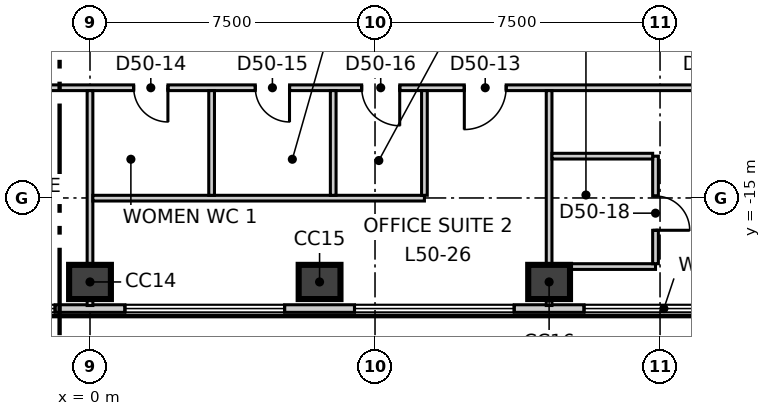
"""IFC4 building model, lengths in metres.
Left out: names, types, materials, properties, quantities, classifications, styles, units other than length and angle.
Written with IfcOpenShell. Run it as: python <this file> out.ifc"""

import sys

from ifc_helpers import new_model, si_unit, direction, frame, frame_2d, origin, origin_2d, place, context, subcontext, project, spatial, rectangle, extrude, element, fill, save


model = new_model("IFC4")
c1 = context("Model", 3, precision=1e-05, world=origin(), true_north=direction((0.0, 1.0)))
c2 = subcontext(c1, "Body", "Model", "MODEL_VIEW")
j1 = project(units=[si_unit("LENGTHUNIT", "METRE"), si_unit("PLANEANGLEUNIT", "RADIAN")], contexts=[c1])
p1 = place(None, origin())
s1 = spatial("IfcSite", under=j1, at=p1, CompositionType="ELEMENT")
p2 = place(p1, origin())
s2 = spatial("IfcBuilding", under=s1, at=p2, CompositionType="ELEMENT")
p3 = place(p2, frame((0.0, 0.0, 215.3)))
s3 = spatial("IfcBuildingStorey", under=s2, at=p3, CompositionType="ELEMENT", Elevation=215.3)
for number, where, z_axis, x_axis in (
    (1, (0.0, -17.21, -0.3), (0.0, 0.0, 1.0), (1.0, 0.0, 0.0)),
    (2, (6.041, -17.21, -0.3), (0.0, 0.0, 1.0), (1.0, 0.0, 0.0)),
    (3, (12.081, -17.21, -0.3), (0.0, 0.0, 1.0), (1.0, 0.0, 0.0)),
):
    element("IfcColumn", number, at=place(p3, frame(where, z_axis=z_axis, x_axis=x_axis)), inside=s3, PredefinedType="COLUMN", context=c2, shape_type="SweptSolid", body=[
        extrude(rectangle(XDim=1.1, YDim=0.9, at=origin_2d()), origin(), (0.0, 0.0, 1.0), 4.0),
    ])
p4 = place(p3, frame((-25.465, -17.91, 0.0), z_axis=(0.0, 0.0, 1.0), x_axis=(1.0, 0.0, 0.0)))
e4 = element("IfcWall", 4, at=p4, inside=s3, PredefinedType="ELEMENTEDWALL", context=c2, shape_type="SweptSolid", body=[
    extrude(rectangle(XDim=50.91, YDim=0.2, at=frame_2d((25.455, 0.0))), origin(), (0.0, 0.0, 1.0), 3.7),
])
p5 = place(p4, frame((2.223, 0.0, 0.9)))
e5 = element("IfcOpeningElement", 5, at=p5, cuts=e4, PredefinedType="OPENING", context=c2, shape_type="SweptSolid", body=[
    extrude(rectangle(XDim=4.2, YDim=2.5, at=frame_2d((2.1, 1.25))), frame((0.0, 0.11, 0.0), z_axis=(0.0, -1.0, 0.0), x_axis=(1.0, 0.0, 0.0)), (0.0, 0.0, 1.0), 0.22),
])
p6 = place(p4, frame((8.264, 0.0, 0.9)))
e6 = element("IfcOpeningElement", 6, at=p6, cuts=e4, PredefinedType="OPENING", context=c2, shape_type="SweptSolid", body=[
    extrude(rectangle(XDim=4.2, YDim=2.5, at=frame_2d((2.1, 1.25))), frame((0.0, 0.11, 0.0), z_axis=(0.0, -1.0, 0.0), x_axis=(1.0, 0.0, 0.0)), (0.0, 0.0, 1.0), 0.22),
])
p7 = place(p4, frame((14.304, 0.0, 0.9)))
e7 = element("IfcOpeningElement", 7, at=p7, cuts=e4, PredefinedType="OPENING", context=c2, shape_type="SweptSolid", body=[
    extrude(rectangle(XDim=4.2, YDim=2.5, at=frame_2d((2.1, 1.25))), frame((0.0, 0.11, 0.0), z_axis=(0.0, -1.0, 0.0), x_axis=(1.0, 0.0, 0.0)), (0.0, 0.0, 1.0), 0.22),
])
p8 = place(p4, frame((20.345, 0.0, 0.9)))
e8 = element("IfcOpeningElement", 8, at=p8, cuts=e4, PredefinedType="OPENING", context=c2, shape_type="SweptSolid", body=[
    extrude(rectangle(XDim=4.2, YDim=2.5, at=frame_2d((2.1, 1.25))), frame((0.0, 0.11, 0.0), z_axis=(0.0, -1.0, 0.0), x_axis=(1.0, 0.0, 0.0)), (0.0, 0.0, 1.0), 0.22),
])
p9 = place(p4, frame((26.385, 0.0, 0.9)))
e9 = element("IfcOpeningElement", 9, at=p9, cuts=e4, PredefinedType="OPENING", context=c2, shape_type="SweptSolid", body=[
    extrude(rectangle(XDim=4.2, YDim=2.5, at=frame_2d((2.1, 1.25))), frame((0.0, 0.11, 0.0), z_axis=(0.0, -1.0, 0.0), x_axis=(1.0, 0.0, 0.0)), (0.0, 0.0, 1.0), 0.22),
])
p10 = place(p4, frame((32.426, 0.0, 0.9)))
e10 = element("IfcOpeningElement", 10, at=p10, cuts=e4, PredefinedType="OPENING", context=c2, shape_type="SweptSolid", body=[
    extrude(rectangle(XDim=4.2, YDim=2.5, at=frame_2d((2.1, 1.25))), frame((0.0, 0.11, 0.0), z_axis=(0.0, -1.0, 0.0), x_axis=(1.0, 0.0, 0.0)), (0.0, 0.0, 1.0), 0.22),
])
p11 = place(p4, frame((38.466, 0.0, 0.9)))
e11 = element("IfcOpeningElement", 11, at=p11, cuts=e4, PredefinedType="OPENING", context=c2, shape_type="SweptSolid", body=[
    extrude(rectangle(XDim=4.2, YDim=2.5, at=frame_2d((2.1, 1.25))), frame((0.0, 0.11, 0.0), z_axis=(0.0, -1.0, 0.0), x_axis=(1.0, 0.0, 0.0)), (0.0, 0.0, 1.0), 0.22),
])
p12 = place(p4, frame((44.507, 0.0, 0.9)))
e12 = element("IfcOpeningElement", 12, at=p12, cuts=e4, PredefinedType="OPENING", context=c2, shape_type="SweptSolid", body=[
    extrude(rectangle(XDim=4.2, YDim=2.5, at=frame_2d((2.1, 1.25))), frame((0.0, 0.11, 0.0), z_axis=(0.0, -1.0, 0.0), x_axis=(1.0, 0.0, 0.0)), (0.0, 0.0, 1.0), 0.22),
])
p13 = place(p3, frame((28.243, -13.098, 0.0), z_axis=(0.0, 0.0, 1.0), x_axis=(-0.500001688958, 0.866024428662, 0.0)))
e13 = element("IfcWall", 13, at=p13, inside=s3, PredefinedType="ELEMENTEDWALL", context=c2, shape_type="SweptSolid", body=[
    extrude(rectangle(XDim=50.909, YDim=0.2, at=frame_2d((25.455, 0.0))), origin(), (0.0, 0.0, 1.0), 3.7),
])
p14 = place(p13, frame((2.223, 0.0, 0.9)))
e14 = element("IfcOpeningElement", 14, at=p14, cuts=e13, PredefinedType="OPENING", context=c2, shape_type="SweptSolid", body=[
    extrude(rectangle(XDim=4.2, YDim=2.5, at=frame_2d((2.1, 1.25))), frame((0.0, 0.11, 0.0), z_axis=(0.0, -1.0, 0.0), x_axis=(1.0, 0.0, 0.0)), (0.0, 0.0, 1.0), 0.22),
])
p15 = place(p13, frame((8.263, 0.0, 0.9)))
e15 = element("IfcOpeningElement", 15, at=p15, cuts=e13, PredefinedType="OPENING", context=c2, shape_type="SweptSolid", body=[
    extrude(rectangle(XDim=4.2, YDim=2.5, at=frame_2d((2.1, 1.25))), frame((0.0, 0.11, 0.0), z_axis=(0.0, -1.0, 0.0), x_axis=(1.0, 0.0, 0.0)), (0.0, 0.0, 1.0), 0.22),
])
p16 = place(p13, frame((14.304, 0.0, 0.9)))
e16 = element("IfcOpeningElement", 16, at=p16, cuts=e13, PredefinedType="OPENING", context=c2, shape_type="SweptSolid", body=[
    extrude(rectangle(XDim=4.2, YDim=2.5, at=frame_2d((2.1, 1.25))), frame((0.0, 0.11, 0.0), z_axis=(0.0, -1.0, 0.0), x_axis=(1.0, 0.0, 0.0)), (0.0, 0.0, 1.0), 0.22),
])
p17 = place(p13, frame((20.345, 0.0, 0.9)))
e17 = element("IfcOpeningElement", 17, at=p17, cuts=e13, PredefinedType="OPENING", context=c2, shape_type="SweptSolid", body=[
    extrude(rectangle(XDim=4.2, YDim=2.5, at=frame_2d((2.1, 1.25))), frame((0.0, 0.11, 0.0), z_axis=(0.0, -1.0, 0.0), x_axis=(1.0, 0.0, 0.0)), (0.0, 0.0, 1.0), 0.22),
])
p18 = place(p13, frame((26.385, 0.0, 0.9)))
e18 = element("IfcOpeningElement", 18, at=p18, cuts=e13, PredefinedType="OPENING", context=c2, shape_type="SweptSolid", body=[
    extrude(rectangle(XDim=4.2, YDim=2.5, at=frame_2d((2.1, 1.25))), frame((0.0, 0.11, 0.0), z_axis=(0.0, -1.0, 0.0), x_axis=(1.0, 0.0, 0.0)), (0.0, 0.0, 1.0), 0.22),
])
p19 = place(p13, frame((32.426, 0.0, 0.9)))
e19 = element("IfcOpeningElement", 19, at=p19, cuts=e13, PredefinedType="OPENING", context=c2, shape_type="SweptSolid", body=[
    extrude(rectangle(XDim=4.2, YDim=2.5, at=frame_2d((2.1, 1.25))), frame((0.0, 0.11, 0.0), z_axis=(0.0, -1.0, 0.0), x_axis=(1.0, 0.0, 0.0)), (0.0, 0.0, 1.0), 0.22),
])
p20 = place(p13, frame((38.466, 0.0, 0.9)))
e20 = element("IfcOpeningElement", 20, at=p20, cuts=e13, PredefinedType="OPENING", context=c2, shape_type="SweptSolid", body=[
    extrude(rectangle(XDim=4.2, YDim=2.5, at=frame_2d((2.1, 1.25))), frame((0.0, 0.11, 0.0), z_axis=(0.0, -1.0, 0.0), x_axis=(1.0, 0.0, 0.0)), (0.0, 0.0, 1.0), 0.22),
])
p21 = place(p13, frame((44.507, 0.0, 0.9)))
e21 = element("IfcOpeningElement", 21, at=p21, cuts=e13, PredefinedType="OPENING", context=c2, shape_type="SweptSolid", body=[
    extrude(rectangle(XDim=4.2, YDim=2.5, at=frame_2d((2.1, 1.25))), frame((0.0, 0.11, 0.0), z_axis=(0.0, -1.0, 0.0), x_axis=(1.0, 0.0, 0.0)), (0.0, 0.0, 1.0), 0.22),
])
p22 = place(p3, frame((-20.883, -11.97, 0.0), z_axis=(0.0, 0.0, 1.0), x_axis=(0.500006150555, 0.866021852731, 0.0)))
e22 = element("IfcWall", 22, at=p22, inside=s3, PredefinedType="PARTITIONING", context=c2, shape_type="SweptSolid", body=[
    extrude(rectangle(XDim=41.766, YDim=0.15, at=frame_2d((20.883, 0.0))), origin(), (0.0, 0.0, 1.0), 3.7),
])
p23 = place(p22, frame((36.816, 0.0, 0.0)))
e23 = element("IfcOpeningElement", 23, at=p23, cuts=e22, PredefinedType="OPENING", context=c2, shape_type="SweptSolid", body=[
    extrude(rectangle(XDim=1.1, YDim=2.1, at=frame_2d((0.55, 1.05))), frame((0.0, 0.085, 0.0), z_axis=(0.0, -1.0, 0.0), x_axis=(1.0, 0.0, 0.0)), (0.0, 0.0, 1.0), 0.17),
])
p24 = place(p22, frame((23.939, 0.0, 0.0)))
e24 = element("IfcOpeningElement", 24, at=p24, cuts=e22, PredefinedType="OPENING", context=c2, shape_type="SweptSolid", body=[
    extrude(rectangle(XDim=1.1, YDim=2.1, at=frame_2d((0.55, 1.05))), frame((0.0, 0.085, 0.0), z_axis=(0.0, -1.0, 0.0), x_axis=(1.0, 0.0, 0.0)), (0.0, 0.0, 1.0), 0.17),
])
p25 = place(p22, frame((31.139, 0.0, 0.0)))
e25 = element("IfcOpeningElement", 25, at=p25, cuts=e22, PredefinedType="OPENING", context=c2, shape_type="SweptSolid", body=[
    extrude(rectangle(XDim=0.9, YDim=2.1, at=frame_2d((0.45, 1.05))), frame((0.0, 0.085, 0.0), z_axis=(0.0, -1.0, 0.0), x_axis=(1.0, 0.0, 0.0)), (0.0, 0.0, 1.0), 0.17),
])
p26 = place(p22, frame((28.739, 0.0, 0.0)))
e26 = element("IfcOpeningElement", 26, at=p26, cuts=e22, PredefinedType="OPENING", context=c2, shape_type="SweptSolid", body=[
    extrude(rectangle(XDim=0.9, YDim=2.1, at=frame_2d((0.45, 1.05))), frame((0.0, 0.085, 0.0), z_axis=(0.0, -1.0, 0.0), x_axis=(1.0, 0.0, 0.0)), (0.0, 0.0, 1.0), 0.17),
])
p27 = place(p22, frame((14.258, 0.0, 0.0)))
e27 = element("IfcOpeningElement", 27, at=p27, cuts=e22, PredefinedType="OPENING", context=c2, shape_type="SweptSolid", body=[
    extrude(rectangle(XDim=1.1, YDim=2.1, at=frame_2d((0.55, 1.05))), frame((0.0, 0.085, 0.0), z_axis=(0.0, -1.0, 0.0), x_axis=(1.0, 0.0, 0.0)), (0.0, 0.0, 1.0), 0.17),
])
p28 = place(p22, frame((3.777, 0.0, 0.0)))
e28 = element("IfcOpeningElement", 28, at=p28, cuts=e22, PredefinedType="OPENING", context=c2, shape_type="SweptSolid", body=[
    extrude(rectangle(XDim=1.1, YDim=2.1, at=frame_2d((0.55, 1.05))), frame((0.0, 0.085, 0.0), z_axis=(0.0, -1.0, 0.0), x_axis=(1.0, 0.0, 0.0)), (0.0, 0.0, 1.0), 0.17),
])
p29 = place(p3, frame((-20.808, -12.1, 0.0), z_axis=(0.0, 0.0, 1.0), x_axis=(1.0, 0.0, 0.0)))
e29 = element("IfcWall", 29, at=p29, inside=s3, PredefinedType="PARTITIONING", context=c2, shape_type="SweptSolid", body=[
    extrude(rectangle(XDim=41.766, YDim=0.15, at=frame_2d((20.883, 0.0))), origin(), (0.0, 0.0, 1.0), 3.7),
])
p30 = place(p29, frame((6.8, 0.0, 0.0)))
e30 = element("IfcOpeningElement", 30, at=p30, cuts=e29, PredefinedType="OPENING", context=c2, shape_type="SweptSolid", body=[
    extrude(rectangle(XDim=1.1, YDim=2.1, at=frame_2d((0.55, 1.05))), frame((0.0, 0.085, 0.0), z_axis=(0.0, -1.0, 0.0), x_axis=(1.0, 0.0, 0.0)), (0.0, 0.0, 1.0), 0.17),
])
p31 = place(p29, frame((17.317, 0.0, 0.0)))
e31 = element("IfcOpeningElement", 31, at=p31, cuts=e29, PredefinedType="OPENING", context=c2, shape_type="SweptSolid", body=[
    extrude(rectangle(XDim=1.0, YDim=2.1, at=frame_2d((0.5, 1.05))), frame((0.0, 0.085, 0.0), z_axis=(0.0, -1.0, 0.0), x_axis=(1.0, 0.0, 0.0)), (0.0, 0.0, 1.0), 0.17),
])
p32 = place(p29, frame((30.658, 0.0, 0.0)))
e32 = element("IfcOpeningElement", 32, at=p32, cuts=e29, PredefinedType="OPENING", context=c2, shape_type="SweptSolid", body=[
    extrude(rectangle(XDim=1.1, YDim=2.1, at=frame_2d((0.55, 1.05))), frame((0.0, 0.085, 0.0), z_axis=(0.0, -1.0, 0.0), x_axis=(1.0, 0.0, 0.0)), (0.0, 0.0, 1.0), 0.17),
])
p33 = place(p29, frame((21.958, 0.0, 0.0)))
e33 = element("IfcOpeningElement", 33, at=p33, cuts=e29, PredefinedType="OPENING", context=c2, shape_type="SweptSolid", body=[
    extrude(rectangle(XDim=0.9, YDim=2.1, at=frame_2d((0.45, 1.05))), frame((0.0, 0.085, 0.0), z_axis=(0.0, -1.0, 0.0), x_axis=(1.0, 0.0, 0.0)), (0.0, 0.0, 1.0), 0.17),
])
p34 = place(p29, frame((25.158, 0.0, 0.0)))
e34 = element("IfcOpeningElement", 34, at=p34, cuts=e29, PredefinedType="OPENING", context=c2, shape_type="SweptSolid", body=[
    extrude(rectangle(XDim=0.9, YDim=2.1, at=frame_2d((0.45, 1.05))), frame((0.0, 0.085, 0.0), z_axis=(0.0, -1.0, 0.0), x_axis=(1.0, 0.0, 0.0)), (0.0, 0.0, 1.0), 0.17),
])
p35 = place(p29, frame((27.958, 0.0, 0.0)))
e35 = element("IfcOpeningElement", 35, at=p35, cuts=e29, PredefinedType="OPENING", context=c2, shape_type="SweptSolid", body=[
    extrude(rectangle(XDim=1.0, YDim=2.1, at=frame_2d((0.5, 1.05))), frame((0.0, 0.085, 0.0), z_axis=(0.0, -1.0, 0.0), x_axis=(1.0, 0.0, 0.0)), (0.0, 0.0, 1.0), 0.17),
])
p36 = place(p29, frame((36.839, 0.0, 0.0)))
e36 = element("IfcOpeningElement", 36, at=p36, cuts=e29, PredefinedType="OPENING", context=c2, shape_type="SweptSolid", body=[
    extrude(rectangle(XDim=1.0, YDim=2.1, at=frame_2d((0.5, 1.05))), frame((0.0, 0.085, 0.0), z_axis=(0.0, -1.0, 0.0), x_axis=(1.0, 0.0, 0.0)), (0.0, 0.0, 1.0), 0.17),
])
p37 = place(p3, frame((0.0, -17.83, 0.0), z_axis=(0.0, 0.0, 1.0), x_axis=(0.0, 1.0, 0.0)))
e37 = element("IfcWall", 37, at=p37, inside=s3, PredefinedType="PARTITIONING", context=c2, shape_type="SweptSolid", body=[
    extrude(rectangle(XDim=5.655, YDim=0.15, at=frame_2d((2.828, 0.0))), origin(), (0.0, 0.0, 1.0), 3.2),
])
p38 = place(p3, frame((0.075, -15.005, 0.0), z_axis=(0.0, 0.0, 1.0), x_axis=(1.0, 0.0, 0.0)))
e38 = element("IfcWall", 38, at=p38, inside=s3, PredefinedType="PARTITIONING", context=c2, shape_type="SweptSolid", body=[
    extrude(rectangle(XDim=8.725, YDim=0.15, at=frame_2d((4.363, 0.0))), origin(), (0.0, 0.0, 1.0), 3.7),
])
p39 = place(p3, frame((0.075, 24.07, 0.0), z_axis=(0.0, 0.0, 1.0), x_axis=(0.500006834213, -0.866021458014, 0.0)))
e39 = element("IfcWall", 39, at=p39, inside=s3, PredefinedType="PARTITIONING", context=c2, shape_type="SweptSolid", body=[
    extrude(rectangle(XDim=41.616, YDim=0.15, at=frame_2d((20.808, 0.0))), origin(), (0.0, 0.0, 1.0), 3.7),
])
p40 = place(p39, frame((33.715, 0.0, 0.0)))
e40 = element("IfcOpeningElement", 40, at=p40, cuts=e39, PredefinedType="OPENING", context=c2, shape_type="SweptSolid", body=[
    extrude(rectangle(XDim=1.1, YDim=2.1, at=frame_2d((0.55, 1.05))), frame((0.0, 0.085, 0.0), z_axis=(0.0, -1.0, 0.0), x_axis=(1.0, 0.0, 0.0)), (0.0, 0.0, 1.0), 0.17),
])
p41 = place(p39, frame((22.098, 0.0, 0.0)))
e41 = element("IfcOpeningElement", 41, at=p41, cuts=e39, PredefinedType="OPENING", context=c2, shape_type="SweptSolid", body=[
    extrude(rectangle(XDim=1.0, YDim=2.1, at=frame_2d((0.5, 1.05))), frame((0.0, 0.085, 0.0), z_axis=(0.0, -1.0, 0.0), x_axis=(1.0, 0.0, 0.0)), (0.0, 0.0, 1.0), 0.17),
])
p42 = place(p39, frame((25.198, 0.0, 0.0)))
e42 = element("IfcOpeningElement", 42, at=p42, cuts=e39, PredefinedType="OPENING", context=c2, shape_type="SweptSolid", body=[
    extrude(rectangle(XDim=0.9, YDim=2.1, at=frame_2d((0.45, 1.05))), frame((0.0, 0.085, 0.0), z_axis=(0.0, -1.0, 0.0), x_axis=(1.0, 0.0, 0.0)), (0.0, 0.0, 1.0), 0.17),
])
p43 = place(p39, frame((9.858, 0.0, 0.0)))
e43 = element("IfcOpeningElement", 43, at=p43, cuts=e39, PredefinedType="OPENING", context=c2, shape_type="SweptSolid", body=[
    extrude(rectangle(XDim=1.1, YDim=2.1, at=frame_2d((0.55, 1.05))), frame((0.0, 0.085, 0.0), z_axis=(0.0, -1.0, 0.0), x_axis=(1.0, 0.0, 0.0)), (0.0, 0.0, 1.0), 0.17),
])
p44 = place(p39, frame((18.758, 0.0, 0.0)))
e44 = element("IfcOpeningElement", 44, at=p44, cuts=e39, PredefinedType="OPENING", context=c2, shape_type="SweptSolid", body=[
    extrude(rectangle(XDim=0.9, YDim=2.1, at=frame_2d((0.45, 1.05))), frame((0.0, 0.085, 0.0), z_axis=(0.0, -1.0, 0.0), x_axis=(1.0, 0.0, 0.0)), (0.0, 0.0, 1.0), 0.17),
])
p45 = place(p39, frame((15.558, 0.0, 0.0)))
e45 = element("IfcOpeningElement", 45, at=p45, cuts=e39, PredefinedType="OPENING", context=c2, shape_type="SweptSolid", body=[
    extrude(rectangle(XDim=0.9, YDim=2.1, at=frame_2d((0.45, 1.05))), frame((0.0, 0.085, 0.0), z_axis=(0.0, -1.0, 0.0), x_axis=(1.0, 0.0, 0.0)), (0.0, 0.0, 1.0), 0.17),
])
p46 = place(p39, frame((12.658, 0.0, 0.0)))
e46 = element("IfcOpeningElement", 46, at=p46, cuts=e39, PredefinedType="OPENING", context=c2, shape_type="SweptSolid", body=[
    extrude(rectangle(XDim=1.0, YDim=2.1, at=frame_2d((0.5, 1.05))), frame((0.0, 0.085, 0.0), z_axis=(0.0, -1.0, 0.0), x_axis=(1.0, 0.0, 0.0)), (0.0, 0.0, 1.0), 0.17),
])
p47 = place(p39, frame((3.776, 0.0, 0.0)))
e47 = element("IfcOpeningElement", 47, at=p47, cuts=e39, PredefinedType="OPENING", context=c2, shape_type="SweptSolid", body=[
    extrude(rectangle(XDim=1.1, YDim=2.1, at=frame_2d((0.55, 1.05))), frame((0.0, 0.085, 0.0), z_axis=(0.0, -1.0, 0.0), x_axis=(1.0, 0.0, 0.0)), (0.0, 0.0, 1.0), 0.17),
])
for number, where, z_axis, x_axis in (
    (48, (3.2, -14.93, 0.0), (0.0, 0.0, 1.0), (0.0, 1.0, 0.0)),
    (49, (8.8, -14.93, 0.0), (0.0, 0.0, 1.0), (0.0, 1.0, 0.0)),
    (50, (6.4, -14.93, 0.0), (0.0, 0.0, 1.0), (0.0, 1.0, 0.0)),
):
    element("IfcWall", number, at=place(p3, frame(where, z_axis=z_axis, x_axis=x_axis)), inside=s3, PredefinedType="PARTITIONING", context=c2, shape_type="SweptSolid", body=[
        extrude(rectangle(XDim=2.755, YDim=0.15, at=frame_2d((1.377, 0.0))), origin(), (0.0, 0.0, 1.0), 3.7),
    ])
p48 = place(p3, frame((12.081, -17.83, 0.0), z_axis=(0.0, 0.0, 1.0), x_axis=(0.0, 1.0, 0.0)))
e51 = element("IfcWall", 51, at=p48, inside=s3, PredefinedType="PARTITIONING", context=c2, shape_type="SweptSolid", body=[
    extrude(rectangle(XDim=5.655, YDim=0.15, at=frame_2d((2.828, 0.0))), origin(), (0.0, 0.0, 1.0), 3.7),
])
p49 = place(p3, frame((12.156, -16.805, 0.0), z_axis=(0.0, 0.0, 1.0), x_axis=(1.0, 0.0, 0.0)))
e52 = element("IfcWall", 52, at=p49, inside=s3, PredefinedType="PARTITIONING", context=c2, shape_type="SweptSolid", body=[
    extrude(rectangle(XDim=2.725, YDim=0.15, at=frame_2d((1.363, 0.0))), origin(), (0.0, 0.0, 1.0), 2.95),
])
p50 = place(p3, frame((14.881, -16.73, 0.0), z_axis=(0.0, 0.0, 1.0), x_axis=(0.0, 1.0, 0.0)))
e53 = element("IfcWall", 53, at=p50, inside=s3, PredefinedType="PARTITIONING", context=c2, shape_type="SweptSolid", body=[
    extrude(rectangle(XDim=2.83, YDim=0.15, at=frame_2d((1.415, 0.0))), origin(), (0.0, 0.0, 1.0), 3.7),
])
p51 = place(p50, frame((0.88, 0.0, 0.0)))
e54 = element("IfcOpeningElement", 54, at=p51, cuts=e53, PredefinedType="OPENING", context=c2, shape_type="SweptSolid", body=[
    extrude(rectangle(XDim=0.9, YDim=2.1, at=frame_2d((0.45, 1.05))), frame((0.0, 0.085, 0.0), z_axis=(0.0, -1.0, 0.0), x_axis=(1.0, 0.0, 0.0)), (0.0, 0.0, 1.0), 0.17),
])
p52 = place(p3, frame((12.156, -13.9, 0.0), z_axis=(0.0, 0.0, 1.0), x_axis=(1.0, 0.0, 0.0)))
e55 = element("IfcWall", 55, at=p52, inside=s3, PredefinedType="PARTITIONING", context=c2, shape_type="SweptSolid", body=[
    extrude(rectangle(XDim=2.65, YDim=0.15, at=frame_2d((1.325, 0.0))), origin(), (0.0, 0.0, 1.0), 3.7),
])
p53 = place(p8, origin())
e56 = element("IfcWindow", 56, at=p53, inside=s3, PartitioningType="SINGLE_PANEL", PredefinedType="WINDOW", context=c2, shape_type="SweptSolid", body=[
    extrude(rectangle(XDim=4.2, YDim=2.5, at=frame_2d((2.1, 1.25))), frame((0.0, 0.03, 0.0), z_axis=(0.0, -1.0, 0.0), x_axis=(1.0, 0.0, 0.0)), (0.0, 0.0, 1.0), 0.06),
])
fill(e8, e56)
p54 = place(p9, origin())
e57 = element("IfcWindow", 57, at=p54, inside=s3, PartitioningType="SINGLE_PANEL", PredefinedType="WINDOW", context=c2, shape_type="SweptSolid", body=[
    extrude(rectangle(XDim=4.2, YDim=2.5, at=frame_2d((2.1, 1.25))), frame((0.0, 0.03, 0.0), z_axis=(0.0, -1.0, 0.0), x_axis=(1.0, 0.0, 0.0)), (0.0, 0.0, 1.0), 0.06),
])
fill(e9, e57)
p55 = place(p10, origin())
e58 = element("IfcWindow", 58, at=p55, inside=s3, PartitioningType="SINGLE_PANEL", PredefinedType="WINDOW", context=c2, shape_type="SweptSolid", body=[
    extrude(rectangle(XDim=4.2, YDim=2.5, at=frame_2d((2.1, 1.25))), frame((0.0, 0.03, 0.0), z_axis=(0.0, -1.0, 0.0), x_axis=(1.0, 0.0, 0.0)), (0.0, 0.0, 1.0), 0.06),
])
fill(e10, e58)
p56 = place(p11, origin())
e59 = element("IfcWindow", 59, at=p56, inside=s3, PartitioningType="SINGLE_PANEL", PredefinedType="WINDOW", context=c2, shape_type="SweptSolid", body=[
    extrude(rectangle(XDim=4.2, YDim=2.5, at=frame_2d((2.1, 1.25))), frame((0.0, 0.03, 0.0), z_axis=(0.0, -1.0, 0.0), x_axis=(1.0, 0.0, 0.0)), (0.0, 0.0, 1.0), 0.06),
])
fill(e11, e59)
p57 = place(p32, origin())
e60 = element("IfcDoor", 60, at=p57, inside=s3, OperationType="SINGLE_SWING_LEFT", PredefinedType="DOOR", context=c2, shape_type="SweptSolid", body=[
    extrude(rectangle(XDim=1.1, YDim=2.1, at=frame_2d((0.55, 1.05))), frame((0.0, 0.025, 0.0), z_axis=(0.0, -1.0, 0.0), x_axis=(1.0, 0.0, 0.0)), (0.0, 0.0, 1.0), 0.05),
])
fill(e32, e60)
p58 = place(p33, origin())
e61 = element("IfcDoor", 61, at=p58, inside=s3, OperationType="SINGLE_SWING_RIGHT", PredefinedType="DOOR", context=c2, shape_type="SweptSolid", body=[
    extrude(rectangle(XDim=0.9, YDim=2.1, at=frame_2d((0.45, 1.05))), frame((0.0, 0.025, 0.0), z_axis=(0.0, -1.0, 0.0), x_axis=(1.0, 0.0, 0.0)), (0.0, 0.0, 1.0), 0.05),
])
fill(e33, e61)
p59 = place(p34, origin())
e62 = element("IfcDoor", 62, at=p59, inside=s3, OperationType="SINGLE_SWING_RIGHT", PredefinedType="DOOR", context=c2, shape_type="SweptSolid", body=[
    extrude(rectangle(XDim=0.9, YDim=2.1, at=frame_2d((0.45, 1.05))), frame((0.0, 0.025, 0.0), z_axis=(0.0, -1.0, 0.0), x_axis=(1.0, 0.0, 0.0)), (0.0, 0.0, 1.0), 0.05),
])
fill(e34, e62)
p60 = place(p35, origin())
e63 = element("IfcDoor", 63, at=p60, inside=s3, OperationType="SINGLE_SWING_RIGHT", PredefinedType="DOOR", context=c2, shape_type="SweptSolid", body=[
    extrude(rectangle(XDim=1.0, YDim=2.1, at=frame_2d((0.5, 1.05))), frame((0.0, 0.025, 0.0), z_axis=(0.0, -1.0, 0.0), x_axis=(1.0, 0.0, 0.0)), (0.0, 0.0, 1.0), 0.05),
])
fill(e35, e63)
p61 = place(p51, origin())
e64 = element("IfcDoor", 64, at=p61, inside=s3, OperationType="SINGLE_SWING_LEFT", PredefinedType="DOOR", context=c2, shape_type="SweptSolid", body=[
    extrude(rectangle(XDim=0.9, YDim=2.1, at=frame_2d((0.45, 1.05))), frame((0.0, 0.025, 0.0), z_axis=(0.0, -1.0, 0.0), x_axis=(1.0, 0.0, 0.0)), (0.0, 0.0, 1.0), 0.05),
])
fill(e54, e64)
save(model, sys.argv[1])
